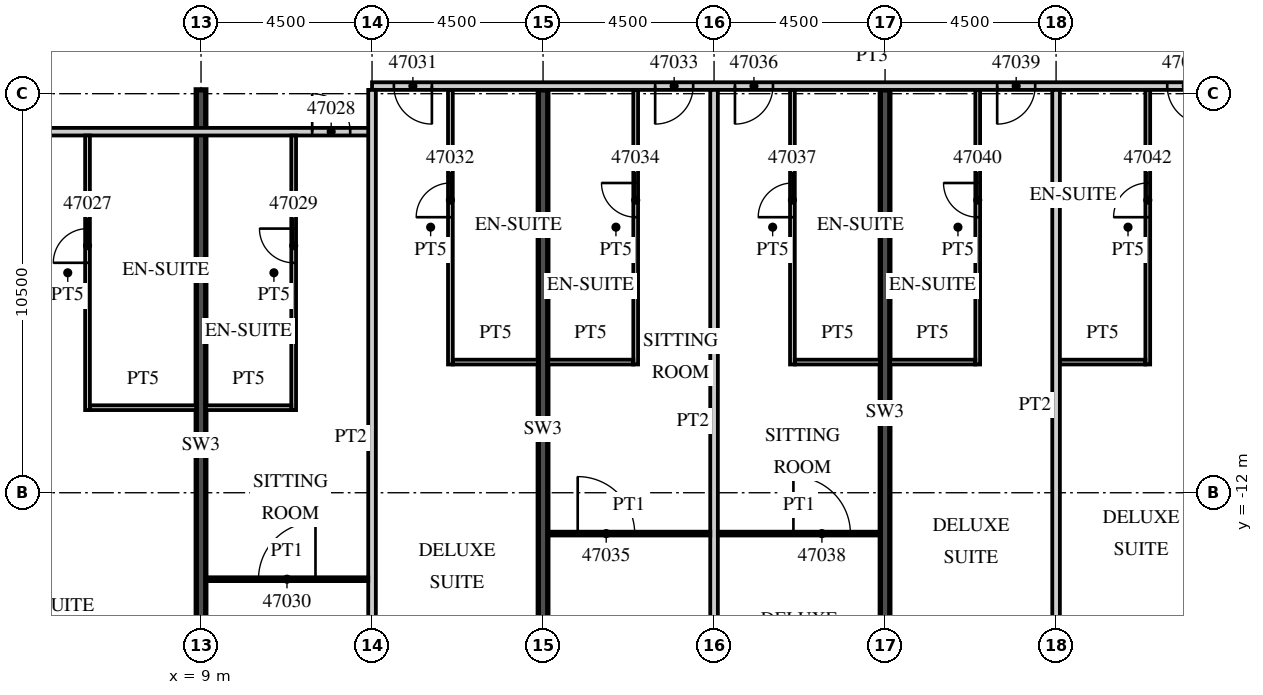
"""IFC4 building model, lengths in metres.
Left out: names, types, materials, properties, quantities, classifications, styles, units other than length and angle.
Written with IfcOpenShell. Run it as: python <this file> out.ifc"""

import sys

from ifc_helpers import new_model, si_unit, direction, frame, frame_2d, origin, place, context, subcontext, project, spatial, rectangle, extrude, element, fill, save


model = new_model("IFC4")
c1 = context("Model", 3, precision=1e-05, world=origin(), true_north=direction((0.0, 1.0)))
c2 = subcontext(c1, "Body", "Model", "MODEL_VIEW")
j1 = project(units=[si_unit("LENGTHUNIT", "METRE"), si_unit("PLANEANGLEUNIT", "RADIAN")], contexts=[c1])
p1 = place(None, origin())
s1 = spatial("IfcSite", under=j1, at=p1, CompositionType="ELEMENT")
p2 = place(p1, origin())
s2 = spatial("IfcBuilding", under=s1, at=p2, CompositionType="ELEMENT")
p3 = place(p2, frame((0.0, 0.0, 196.6)))
s3 = spatial("IfcBuildingStorey", under=s2, at=p3, CompositionType="ELEMENT", Elevation=196.6)
p4 = place(p3, frame((9.0, -20.112, 0.0), z_axis=(0.0, 0.0, 1.0), x_axis=(0.0, 1.0, 0.0)))
e1 = element("IfcWall", 1, at=p4, inside=s3, PredefinedType="SHEAR", context=c2, shape_type="SweptSolid", body=[
    extrude(rectangle(XDim=18.712, YDim=0.25, at=frame_2d((9.356, 0.0))), origin(), (0.0, 0.0, 1.0), 3.3),
])
p5 = place(p3, frame((18.0, -19.245, 0.0), z_axis=(0.0, 0.0, 1.0), x_axis=(0.0, 1.0, 0.0)))
e2 = element("IfcWall", 2, at=p5, inside=s3, PredefinedType="SHEAR", context=c2, shape_type="SweptSolid", body=[
    extrude(rectangle(XDim=17.845, YDim=0.25, at=frame_2d((8.923, 0.0))), origin(), (0.0, 0.0, 1.0), 3.3),
])
p6 = place(p3, frame((27.0, -18.379, 0.0), z_axis=(0.0, 0.0, 1.0), x_axis=(0.0, 1.0, 0.0)))
e3 = element("IfcWall", 3, at=p6, inside=s3, PredefinedType="SHEAR", context=c2, shape_type="SweptSolid", body=[
    extrude(rectangle(XDim=16.979, YDim=0.25, at=frame_2d((8.489, 0.0))), origin(), (0.0, 0.0, 1.0), 3.3),
])
p7 = place(p3, frame((-13.5, -2.5, 0.0), z_axis=(0.0, 0.0, 1.0), x_axis=(1.0, 0.0, 0.0)))
e4 = element("IfcWall", 4, at=p7, inside=s3, PredefinedType="PARTITIONING", context=c2, shape_type="SweptSolid", body=[
    extrude(rectangle(XDim=27.0, YDim=0.2, at=frame_2d((13.5, 0.0))), origin(), (0.0, 0.0, 1.0), 3.02),
])
p8 = place(p7, frame((2.925, 0.0, 0.0)))
e5 = element("IfcOpeningElement", 5, at=p8, cuts=e4, PredefinedType="OPENING", context=c2, shape_type="SweptSolid", body=[
    extrude(rectangle(XDim=1.0, YDim=2.1, at=frame_2d((0.5, 1.05))), frame((0.0, 0.11, 0.0), z_axis=(0.0, -1.0, 0.0), x_axis=(1.0, 0.0, 0.0)), (0.0, 0.0, 1.0), 0.22),
])
p9 = place(p7, frame((5.075, 0.0, 0.0)))
e6 = element("IfcOpeningElement", 6, at=p9, cuts=e4, PredefinedType="OPENING", context=c2, shape_type="SweptSolid", body=[
    extrude(rectangle(XDim=1.0, YDim=2.1, at=frame_2d((0.5, 1.05))), frame((0.0, 0.11, 0.0), z_axis=(0.0, -1.0, 0.0), x_axis=(1.0, 0.0, 0.0)), (0.0, 0.0, 1.0), 0.22),
])
p10 = place(p7, frame((11.925, 0.0, 0.0)))
e7 = element("IfcOpeningElement", 7, at=p10, cuts=e4, PredefinedType="OPENING", context=c2, shape_type="SweptSolid", body=[
    extrude(rectangle(XDim=1.0, YDim=2.1, at=frame_2d((0.5, 1.05))), frame((0.0, 0.11, 0.0), z_axis=(0.0, -1.0, 0.0), x_axis=(1.0, 0.0, 0.0)), (0.0, 0.0, 1.0), 0.22),
])
p11 = place(p7, frame((15.938, 0.0, 0.0)))
e8 = element("IfcOpeningElement", 8, at=p11, cuts=e4, PredefinedType="OPENING", context=c2, shape_type="SweptSolid", body=[
    extrude(rectangle(XDim=1.2, YDim=2.1, at=frame_2d((0.6, 1.05))), frame((0.0, 0.11, 0.0), z_axis=(0.0, -1.0, 0.0), x_axis=(1.0, 0.0, 0.0)), (0.0, 0.0, 1.0), 0.22),
])
p12 = place(p7, frame((25.425, 0.0, 0.0)))
e9 = element("IfcOpeningElement", 9, at=p12, cuts=e4, PredefinedType="OPENING", context=c2, shape_type="SweptSolid", body=[
    extrude(rectangle(XDim=1.0, YDim=2.1, at=frame_2d((0.5, 1.05))), frame((0.0, 0.11, 0.0), z_axis=(0.0, -1.0, 0.0), x_axis=(1.0, 0.0, 0.0)), (0.0, 0.0, 1.0), 0.22),
])
p13 = place(p3, frame((13.5, -1.3, 0.0), z_axis=(0.0, 0.0, 1.0), x_axis=(1.0, 0.0, 0.0)))
e10 = element("IfcWall", 10, at=p13, inside=s3, PredefinedType="PARTITIONING", context=c2, shape_type="SweptSolid", body=[
    extrude(rectangle(XDim=26.317, YDim=0.2, at=frame_2d((13.158, 0.0))), origin(), (0.0, 0.0, 1.0), 3.02),
])
p14 = place(p13, frame((0.575, 0.0, 0.0)))
e11 = element("IfcOpeningElement", 11, at=p14, cuts=e10, PredefinedType="OPENING", context=c2, shape_type="SweptSolid", body=[
    extrude(rectangle(XDim=1.0, YDim=2.1, at=frame_2d((0.5, 1.05))), frame((0.0, 0.11, 0.0), z_axis=(0.0, -1.0, 0.0), x_axis=(1.0, 0.0, 0.0)), (0.0, 0.0, 1.0), 0.22),
])
p15 = place(p13, frame((7.45, 0.0, 0.0)))
e12 = element("IfcOpeningElement", 12, at=p15, cuts=e10, PredefinedType="OPENING", context=c2, shape_type="SweptSolid", body=[
    extrude(rectangle(XDim=1.0, YDim=2.1, at=frame_2d((0.5, 1.05))), frame((0.0, 0.11, 0.0), z_axis=(0.0, -1.0, 0.0), x_axis=(1.0, 0.0, 0.0)), (0.0, 0.0, 1.0), 0.22),
])
p16 = place(p13, frame((9.55, 0.0, 0.0)))
e13 = element("IfcOpeningElement", 13, at=p16, cuts=e10, PredefinedType="OPENING", context=c2, shape_type="SweptSolid", body=[
    extrude(rectangle(XDim=1.0, YDim=2.1, at=frame_2d((0.5, 1.05))), frame((0.0, 0.11, 0.0), z_axis=(0.0, -1.0, 0.0), x_axis=(1.0, 0.0, 0.0)), (0.0, 0.0, 1.0), 0.22),
])
p17 = place(p13, frame((16.45, 0.0, 0.0)))
e14 = element("IfcOpeningElement", 14, at=p17, cuts=e10, PredefinedType="OPENING", context=c2, shape_type="SweptSolid", body=[
    extrude(rectangle(XDim=1.0, YDim=2.1, at=frame_2d((0.5, 1.05))), frame((0.0, 0.11, 0.0), z_axis=(0.0, -1.0, 0.0), x_axis=(1.0, 0.0, 0.0)), (0.0, 0.0, 1.0), 0.22),
])
p18 = place(p13, frame((20.925, 0.0, 0.0)))
e15 = element("IfcOpeningElement", 15, at=p18, cuts=e10, PredefinedType="OPENING", context=c2, shape_type="SweptSolid", body=[
    extrude(rectangle(XDim=1.0, YDim=2.1, at=frame_2d((0.5, 1.05))), frame((0.0, 0.11, 0.0), z_axis=(0.0, -1.0, 0.0), x_axis=(1.0, 0.0, 0.0)), (0.0, 0.0, 1.0), 0.22),
])
p19 = place(p13, frame((25.267, 0.0, 0.0)))
e16 = element("IfcOpeningElement", 16, at=p19, cuts=e10, PredefinedType="OPENING", context=c2, shape_type="SweptSolid", body=[
    extrude(rectangle(XDim=0.9, YDim=2.1, at=frame_2d((0.45, 1.05))), frame((0.0, 0.11, 0.0), z_axis=(0.0, -1.0, 0.0), x_axis=(1.0, 0.0, 0.0)), (0.0, 0.0, 1.0), 0.22),
])
p20 = place(p3, frame((6.013, -9.825, 0.0), z_axis=(0.0, 0.0, 1.0), x_axis=(0.0, 1.0, 0.0)))
e17 = element("IfcWall", 17, at=p20, inside=s3, PredefinedType="PARTITIONING", context=c2, shape_type="SweptSolid", body=[
    extrude(rectangle(XDim=7.225, YDim=0.125, at=frame_2d((3.612, 0.0))), origin(), (0.0, 0.0, 1.0), 3.02),
])
p21 = place(p20, frame((3.875, 0.0, 0.0)))
e18 = element("IfcOpeningElement", 18, at=p21, cuts=e17, PredefinedType="OPENING", context=c2, shape_type="SweptSolid", body=[
    extrude(rectangle(XDim=0.9, YDim=2.1, at=frame_2d((0.45, 1.05))), frame((0.0, 0.073, 0.0), z_axis=(0.0, -1.0, 0.0), x_axis=(1.0, 0.0, 0.0)), (0.0, 0.0, 1.0), 0.145),
])
p22 = place(p3, frame((6.075, -9.762, 0.0), z_axis=(0.0, 0.0, 1.0), x_axis=(1.0, 0.0, 0.0)))
e19 = element("IfcWall", 19, at=p22, inside=s3, PredefinedType="PARTITIONING", context=c2, shape_type="SweptSolid", body=[
    extrude(rectangle(XDim=2.8, YDim=0.125, at=frame_2d((1.4, 0.0))), origin(), (0.0, 0.0, 1.0), 3.02),
])
p23 = place(p3, frame((13.5, -19.701, 0.0), z_axis=(0.0, 0.0, 1.0), x_axis=(0.0, 1.0, 0.0)))
e20 = element("IfcWall", 20, at=p23, inside=s3, PredefinedType="PARTITIONING", context=c2, shape_type="SweptSolid", body=[
    extrude(rectangle(XDim=18.301, YDim=0.2, at=frame_2d((9.15, 0.0))), origin(), (0.0, 0.0, 1.0), 3.02),
])
p24 = place(p3, frame((11.438, -9.825, 0.0), z_axis=(0.0, 0.0, 1.0), x_axis=(0.0, 1.0, 0.0)))
e21 = element("IfcWall", 21, at=p24, inside=s3, PredefinedType="PARTITIONING", context=c2, shape_type="SweptSolid", body=[
    extrude(rectangle(XDim=7.225, YDim=0.125, at=frame_2d((3.612, 0.0))), origin(), (0.0, 0.0, 1.0), 3.02),
])
p25 = place(p24, frame((3.875, 0.0, 0.0)))
e22 = element("IfcOpeningElement", 22, at=p25, cuts=e21, PredefinedType="OPENING", context=c2, shape_type="SweptSolid", body=[
    extrude(rectangle(XDim=0.9, YDim=2.1, at=frame_2d((0.45, 1.05))), frame((0.0, 0.073, 0.0), z_axis=(0.0, -1.0, 0.0), x_axis=(1.0, 0.0, 0.0)), (0.0, 0.0, 1.0), 0.145),
])
p26 = place(p3, frame((9.125, -9.762, 0.0), z_axis=(0.0, 0.0, 1.0), x_axis=(1.0, 0.0, 0.0)))
e23 = element("IfcWall", 23, at=p26, inside=s3, PredefinedType="PARTITIONING", context=c2, shape_type="SweptSolid", body=[
    extrude(rectangle(XDim=2.25, YDim=0.125, at=frame_2d((1.125, 0.0))), origin(), (0.0, 0.0, 1.0), 3.02),
])
p27 = place(p3, frame((9.125, -14.275, 0.0), z_axis=(0.0, 0.0, 1.0), x_axis=(1.0, 0.0, 0.0)))
e24 = element("IfcWall", 24, at=p27, inside=s3, PredefinedType="PARTITIONING", context=c2, shape_type="SweptSolid", body=[
    extrude(rectangle(XDim=4.275, YDim=0.1, at=frame_2d((2.137, 0.0))), origin(), (0.0, 0.0, 1.0), 3.02),
])
p28 = place(p27, frame((1.387, 0.0, 0.0)))
e25 = element("IfcOpeningElement", 25, at=p28, cuts=e24, PredefinedType="OPENING", context=c2, shape_type="SweptSolid", body=[
    extrude(rectangle(XDim=1.5, YDim=2.1, at=frame_2d((0.75, 1.05))), frame((0.0, 0.06, 0.0), z_axis=(0.0, -1.0, 0.0), x_axis=(1.0, 0.0, 0.0)), (0.0, 0.0, 1.0), 0.12),
])
p29 = place(p3, frame((15.562, -8.625, 0.0), z_axis=(0.0, 0.0, 1.0), x_axis=(0.0, 1.0, 0.0)))
e26 = element("IfcWall", 26, at=p29, inside=s3, PredefinedType="PARTITIONING", context=c2, shape_type="SweptSolid", body=[
    extrude(rectangle(XDim=7.225, YDim=0.125, at=frame_2d((3.613, 0.0))), origin(), (0.0, 0.0, 1.0), 3.02),
])
p30 = place(p29, frame((3.875, 0.0, 0.0)))
e27 = element("IfcOpeningElement", 27, at=p30, cuts=e26, PredefinedType="OPENING", context=c2, shape_type="SweptSolid", body=[
    extrude(rectangle(XDim=0.9, YDim=2.1, at=frame_2d((0.45, 1.05))), frame((0.0, 0.073, 0.0), z_axis=(0.0, -1.0, 0.0), x_axis=(1.0, 0.0, 0.0)), (0.0, 0.0, 1.0), 0.145),
])
p31 = place(p3, frame((15.625, -8.562, 0.0), z_axis=(0.0, 0.0, 1.0), x_axis=(1.0, 0.0, 0.0)))
e28 = element("IfcWall", 28, at=p31, inside=s3, PredefinedType="PARTITIONING", context=c2, shape_type="SweptSolid", body=[
    extrude(rectangle(XDim=2.25, YDim=0.125, at=frame_2d((1.125, 0.0))), origin(), (0.0, 0.0, 1.0), 3.02),
])
p32 = place(p3, frame((22.5, -18.834, 0.0), z_axis=(0.0, 0.0, 1.0), x_axis=(0.0, 1.0, 0.0)))
e29 = element("IfcWall", 29, at=p32, inside=s3, PredefinedType="PARTITIONING", context=c2, shape_type="SweptSolid", body=[
    extrude(rectangle(XDim=17.434, YDim=0.2, at=frame_2d((8.717, 0.0))), origin(), (0.0, 0.0, 1.0), 3.02),
])
p33 = place(p3, frame((20.438, -8.625, 0.0), z_axis=(0.0, 0.0, 1.0), x_axis=(0.0, 1.0, 0.0)))
e30 = element("IfcWall", 30, at=p33, inside=s3, PredefinedType="PARTITIONING", context=c2, shape_type="SweptSolid", body=[
    extrude(rectangle(XDim=7.225, YDim=0.125, at=frame_2d((3.613, 0.0))), origin(), (0.0, 0.0, 1.0), 3.02),
])
p34 = place(p33, frame((3.875, 0.0, 0.0)))
e31 = element("IfcOpeningElement", 31, at=p34, cuts=e30, PredefinedType="OPENING", context=c2, shape_type="SweptSolid", body=[
    extrude(rectangle(XDim=0.9, YDim=2.1, at=frame_2d((0.45, 1.05))), frame((0.0, 0.073, 0.0), z_axis=(0.0, -1.0, 0.0), x_axis=(1.0, 0.0, 0.0)), (0.0, 0.0, 1.0), 0.145),
])
p35 = place(p3, frame((18.125, -8.562, 0.0), z_axis=(0.0, 0.0, 1.0), x_axis=(1.0, 0.0, 0.0)))
e32 = element("IfcWall", 32, at=p35, inside=s3, PredefinedType="PARTITIONING", context=c2, shape_type="SweptSolid", body=[
    extrude(rectangle(XDim=2.25, YDim=0.125, at=frame_2d((1.125, 0.0))), origin(), (0.0, 0.0, 1.0), 3.02),
])
p36 = place(p3, frame((18.125, -13.075, 0.0), z_axis=(0.0, 0.0, 1.0), x_axis=(1.0, 0.0, 0.0)))
e33 = element("IfcWall", 33, at=p36, inside=s3, PredefinedType="PARTITIONING", context=c2, shape_type="SweptSolid", body=[
    extrude(rectangle(XDim=4.275, YDim=0.1, at=frame_2d((2.137, 0.0))), origin(), (0.0, 0.0, 1.0), 3.02),
])
p37 = place(p36, frame((0.787, 0.0, 0.0)))
e34 = element("IfcOpeningElement", 34, at=p37, cuts=e33, PredefinedType="OPENING", context=c2, shape_type="SweptSolid", body=[
    extrude(rectangle(XDim=1.5, YDim=2.1, at=frame_2d((0.75, 1.05))), frame((0.0, 0.06, 0.0), z_axis=(0.0, -1.0, 0.0), x_axis=(1.0, 0.0, 0.0)), (0.0, 0.0, 1.0), 0.12),
])
p38 = place(p3, frame((24.562, -8.625, 0.0), z_axis=(0.0, 0.0, 1.0), x_axis=(0.0, 1.0, 0.0)))
e35 = element("IfcWall", 35, at=p38, inside=s3, PredefinedType="PARTITIONING", context=c2, shape_type="SweptSolid", body=[
    extrude(rectangle(XDim=7.225, YDim=0.125, at=frame_2d((3.613, 0.0))), origin(), (0.0, 0.0, 1.0), 3.02),
])
p39 = place(p38, frame((3.875, 0.0, 0.0)))
e36 = element("IfcOpeningElement", 36, at=p39, cuts=e35, PredefinedType="OPENING", context=c2, shape_type="SweptSolid", body=[
    extrude(rectangle(XDim=0.9, YDim=2.1, at=frame_2d((0.45, 1.05))), frame((0.0, 0.073, 0.0), z_axis=(0.0, -1.0, 0.0), x_axis=(1.0, 0.0, 0.0)), (0.0, 0.0, 1.0), 0.145),
])
p40 = place(p3, frame((24.625, -8.562, 0.0), z_axis=(0.0, 0.0, 1.0), x_axis=(1.0, 0.0, 0.0)))
e37 = element("IfcWall", 37, at=p40, inside=s3, PredefinedType="PARTITIONING", context=c2, shape_type="SweptSolid", body=[
    extrude(rectangle(XDim=2.25, YDim=0.125, at=frame_2d((1.125, 0.0))), origin(), (0.0, 0.0, 1.0), 3.02),
])
p41 = place(p3, frame((22.6, -13.075, 0.0), z_axis=(0.0, 0.0, 1.0), x_axis=(1.0, 0.0, 0.0)))
e38 = element("IfcWall", 38, at=p41, inside=s3, PredefinedType="PARTITIONING", context=c2, shape_type="SweptSolid", body=[
    extrude(rectangle(XDim=4.275, YDim=0.1, at=frame_2d((2.137, 0.0))), origin(), (0.0, 0.0, 1.0), 3.02),
])
p42 = place(p41, frame((1.988, 0.0, 0.0)))
e39 = element("IfcOpeningElement", 39, at=p42, cuts=e38, PredefinedType="OPENING", context=c2, shape_type="SweptSolid", body=[
    extrude(rectangle(XDim=1.5, YDim=2.1, at=frame_2d((0.75, 1.05))), frame((0.0, 0.06, 0.0), z_axis=(0.0, -1.0, 0.0), x_axis=(1.0, 0.0, 0.0)), (0.0, 0.0, 1.0), 0.12),
])
p43 = place(p3, frame((31.5, -17.967, 0.0), z_axis=(0.0, 0.0, 1.0), x_axis=(0.0, 1.0, 0.0)))
e40 = element("IfcWall", 40, at=p43, inside=s3, PredefinedType="PARTITIONING", context=c2, shape_type="SweptSolid", body=[
    extrude(rectangle(XDim=16.567, YDim=0.2, at=frame_2d((8.284, 0.0))), origin(), (0.0, 0.0, 1.0), 3.02),
])
p44 = place(p3, frame((29.438, -8.625, 0.0), z_axis=(0.0, 0.0, 1.0), x_axis=(0.0, 1.0, 0.0)))
e41 = element("IfcWall", 41, at=p44, inside=s3, PredefinedType="PARTITIONING", context=c2, shape_type="SweptSolid", body=[
    extrude(rectangle(XDim=7.225, YDim=0.125, at=frame_2d((3.613, 0.0))), origin(), (0.0, 0.0, 1.0), 3.02),
])
p45 = place(p44, frame((3.875, 0.0, 0.0)))
e42 = element("IfcOpeningElement", 42, at=p45, cuts=e41, PredefinedType="OPENING", context=c2, shape_type="SweptSolid", body=[
    extrude(rectangle(XDim=0.9, YDim=2.1, at=frame_2d((0.45, 1.05))), frame((0.0, 0.073, 0.0), z_axis=(0.0, -1.0, 0.0), x_axis=(1.0, 0.0, 0.0)), (0.0, 0.0, 1.0), 0.145),
])
p46 = place(p3, frame((27.125, -8.562, 0.0), z_axis=(0.0, 0.0, 1.0), x_axis=(1.0, 0.0, 0.0)))
e43 = element("IfcWall", 43, at=p46, inside=s3, PredefinedType="PARTITIONING", context=c2, shape_type="SweptSolid", body=[
    extrude(rectangle(XDim=2.25, YDim=0.125, at=frame_2d((1.125, 0.0))), origin(), (0.0, 0.0, 1.0), 3.02),
])
p47 = place(p3, frame((33.913, -8.625, 0.0), z_axis=(0.0, 0.0, 1.0), x_axis=(0.0, 1.0, 0.0)))
e44 = element("IfcWall", 44, at=p47, inside=s3, PredefinedType="PARTITIONING", context=c2, shape_type="SweptSolid", body=[
    extrude(rectangle(XDim=7.225, YDim=0.125, at=frame_2d((3.613, 0.0))), origin(), (0.0, 0.0, 1.0), 3.02),
])
p48 = place(p47, frame((3.875, 0.0, 0.0)))
e45 = element("IfcOpeningElement", 45, at=p48, cuts=e44, PredefinedType="OPENING", context=c2, shape_type="SweptSolid", body=[
    extrude(rectangle(XDim=0.9, YDim=2.1, at=frame_2d((0.45, 1.05))), frame((0.0, 0.073, 0.0), z_axis=(0.0, -1.0, 0.0), x_axis=(1.0, 0.0, 0.0)), (0.0, 0.0, 1.0), 0.145),
])
p49 = place(p3, frame((31.6, -8.562, 0.0), z_axis=(0.0, 0.0, 1.0), x_axis=(1.0, 0.0, 0.0)))
e46 = element("IfcWall", 46, at=p49, inside=s3, PredefinedType="PARTITIONING", context=c2, shape_type="SweptSolid", body=[
    extrude(rectangle(XDim=2.25, YDim=0.125, at=frame_2d((1.125, 0.0))), origin(), (0.0, 0.0, 1.0), 3.02),
])
p50 = place(p21, origin())
e47 = element("IfcDoor", 47, at=p50, inside=s3, OperationType="SINGLE_SWING_LEFT", PredefinedType="DOOR", context=c2, shape_type="SweptSolid", body=[
    extrude(rectangle(XDim=0.9, YDim=2.1, at=frame_2d((0.45, 1.05))), frame((0.0, 0.025, 0.0), z_axis=(0.0, -1.0, 0.0), x_axis=(1.0, 0.0, 0.0)), (0.0, 0.0, 1.0), 0.05),
])
fill(e18, e47)
p51 = place(p12, origin())
e48 = element("IfcDoor", 48, at=p51, inside=s3, OperationType="SINGLE_SWING_LEFT", PredefinedType="DOOR", context=c2, shape_type="SweptSolid", body=[
    extrude(rectangle(XDim=1.0, YDim=2.1, at=frame_2d((0.5, 1.05))), frame((0.0, 0.025, 0.0), z_axis=(0.0, -1.0, 0.0), x_axis=(1.0, 0.0, 0.0)), (0.0, 0.0, 1.0), 0.05),
])
fill(e9, e48)
p52 = place(p25, origin())
e49 = element("IfcDoor", 49, at=p52, inside=s3, OperationType="SINGLE_SWING_RIGHT", PredefinedType="DOOR", context=c2, shape_type="SweptSolid", body=[
    extrude(rectangle(XDim=0.9, YDim=2.1, at=frame_2d((0.45, 1.05))), frame((0.0, 0.025, 0.0), z_axis=(0.0, -1.0, 0.0), x_axis=(1.0, 0.0, 0.0)), (0.0, 0.0, 1.0), 0.05),
])
fill(e22, e49)
p53 = place(p28, origin())
e50 = element("IfcDoor", 50, at=p53, inside=s3, OperationType="SINGLE_SWING_RIGHT", PredefinedType="DOOR", context=c2, shape_type="SweptSolid", body=[
    extrude(rectangle(XDim=1.5, YDim=2.1, at=frame_2d((0.75, 1.05))), frame((0.0, 0.025, 0.0), z_axis=(0.0, -1.0, 0.0), x_axis=(1.0, 0.0, 0.0)), (0.0, 0.0, 1.0), 0.05),
])
fill(e25, e50)
p54 = place(p14, origin())
e51 = element("IfcDoor", 51, at=p54, inside=s3, OperationType="SINGLE_SWING_RIGHT", PredefinedType="DOOR", context=c2, shape_type="SweptSolid", body=[
    extrude(rectangle(XDim=1.0, YDim=2.1, at=frame_2d((0.5, 1.05))), frame((0.0, 0.025, 0.0), z_axis=(0.0, -1.0, 0.0), x_axis=(1.0, 0.0, 0.0)), (0.0, 0.0, 1.0), 0.05),
])
fill(e11, e51)
p55 = place(p30, origin())
e52 = element("IfcDoor", 52, at=p55, inside=s3, OperationType="SINGLE_SWING_LEFT", PredefinedType="DOOR", context=c2, shape_type="SweptSolid", body=[
    extrude(rectangle(XDim=0.9, YDim=2.1, at=frame_2d((0.45, 1.05))), frame((0.0, 0.025, 0.0), z_axis=(0.0, -1.0, 0.0), x_axis=(1.0, 0.0, 0.0)), (0.0, 0.0, 1.0), 0.05),
])
fill(e27, e52)
p56 = place(p15, origin())
e53 = element("IfcDoor", 53, at=p56, inside=s3, OperationType="SINGLE_SWING_LEFT", PredefinedType="DOOR", context=c2, shape_type="SweptSolid", body=[
    extrude(rectangle(XDim=1.0, YDim=2.1, at=frame_2d((0.5, 1.05))), frame((0.0, 0.025, 0.0), z_axis=(0.0, -1.0, 0.0), x_axis=(1.0, 0.0, 0.0)), (0.0, 0.0, 1.0), 0.05),
])
fill(e12, e53)
p57 = place(p34, origin())
e54 = element("IfcDoor", 54, at=p57, inside=s3, OperationType="SINGLE_SWING_RIGHT", PredefinedType="DOOR", context=c2, shape_type="SweptSolid", body=[
    extrude(rectangle(XDim=0.9, YDim=2.1, at=frame_2d((0.45, 1.05))), frame((0.0, 0.025, 0.0), z_axis=(0.0, -1.0, 0.0), x_axis=(1.0, 0.0, 0.0)), (0.0, 0.0, 1.0), 0.05),
])
fill(e31, e54)
p58 = place(p37, origin())
e55 = element("IfcDoor", 55, at=p58, inside=s3, OperationType="SINGLE_SWING_LEFT", PredefinedType="DOOR", context=c2, shape_type="SweptSolid", body=[
    extrude(rectangle(XDim=1.5, YDim=2.1, at=frame_2d((0.75, 1.05))), frame((0.0, 0.025, 0.0), z_axis=(0.0, -1.0, 0.0), x_axis=(1.0, 0.0, 0.0)), (0.0, 0.0, 1.0), 0.05),
])
fill(e34, e55)
p59 = place(p16, origin())
e56 = element("IfcDoor", 56, at=p59, inside=s3, OperationType="SINGLE_SWING_LEFT", PredefinedType="DOOR", context=c2, shape_type="SweptSolid", body=[
    extrude(rectangle(XDim=1.0, YDim=2.1, at=frame_2d((0.5, 1.05))), frame((0.0, 0.025, 0.0), z_axis=(0.0, -1.0, 0.0), x_axis=(1.0, 0.0, 0.0)), (0.0, 0.0, 1.0), 0.05),
])
fill(e13, e56)
p60 = place(p39, origin())
e57 = element("IfcDoor", 57, at=p60, inside=s3, OperationType="SINGLE_SWING_LEFT", PredefinedType="DOOR", context=c2, shape_type="SweptSolid", body=[
    extrude(rectangle(XDim=0.9, YDim=2.1, at=frame_2d((0.45, 1.05))), frame((0.0, 0.025, 0.0), z_axis=(0.0, -1.0, 0.0), x_axis=(1.0, 0.0, 0.0)), (0.0, 0.0, 1.0), 0.05),
])
fill(e36, e57)
p61 = place(p42, origin())
e58 = element("IfcDoor", 58, at=p61, inside=s3, OperationType="SINGLE_SWING_LEFT", PredefinedType="DOOR", context=c2, shape_type="SweptSolid", body=[
    extrude(rectangle(XDim=1.5, YDim=2.1, at=frame_2d((0.75, 1.05))), frame((0.0, 0.025, 0.0), z_axis=(0.0, -1.0, 0.0), x_axis=(1.0, 0.0, 0.0)), (0.0, 0.0, 1.0), 0.05),
])
fill(e39, e58)
p62 = place(p17, origin())
e59 = element("IfcDoor", 59, at=p62, inside=s3, OperationType="SINGLE_SWING_LEFT", PredefinedType="DOOR", context=c2, shape_type="SweptSolid", body=[
    extrude(rectangle(XDim=1.0, YDim=2.1, at=frame_2d((0.5, 1.05))), frame((0.0, 0.025, 0.0), z_axis=(0.0, -1.0, 0.0), x_axis=(1.0, 0.0, 0.0)), (0.0, 0.0, 1.0), 0.05),
])
fill(e14, e59)
p63 = place(p45, origin())
e60 = element("IfcDoor", 60, at=p63, inside=s3, OperationType="SINGLE_SWING_RIGHT", PredefinedType="DOOR", context=c2, shape_type="SweptSolid", body=[
    extrude(rectangle(XDim=0.9, YDim=2.1, at=frame_2d((0.45, 1.05))), frame((0.0, 0.025, 0.0), z_axis=(0.0, -1.0, 0.0), x_axis=(1.0, 0.0, 0.0)), (0.0, 0.0, 1.0), 0.05),
])
fill(e42, e60)
p64 = place(p18, origin())
e61 = element("IfcDoor", 61, at=p64, inside=s3, OperationType="SINGLE_SWING_RIGHT", PredefinedType="DOOR", context=c2, shape_type="SweptSolid", body=[
    extrude(rectangle(XDim=1.0, YDim=2.1, at=frame_2d((0.5, 1.05))), frame((0.0, 0.025, 0.0), z_axis=(0.0, -1.0, 0.0), x_axis=(1.0, 0.0, 0.0)), (0.0, 0.0, 1.0), 0.05),
])
fill(e15, e61)
p65 = place(p48, origin())
e62 = element("IfcDoor", 62, at=p65, inside=s3, OperationType="SINGLE_SWING_LEFT", PredefinedType="DOOR", context=c2, shape_type="SweptSolid", body=[
    extrude(rectangle(XDim=0.9, YDim=2.1, at=frame_2d((0.45, 1.05))), frame((0.0, 0.025, 0.0), z_axis=(0.0, -1.0, 0.0), x_axis=(1.0, 0.0, 0.0)), (0.0, 0.0, 1.0), 0.05),
])
fill(e45, e62)
save(model, sys.argv[1])
